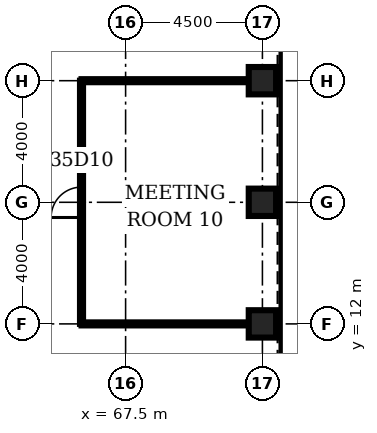
"""IFC4 building model, lengths in metres.
Left out: names, types, materials, properties, quantities, classifications, styles, units other than length and angle.
Written with IfcOpenShell. Run it as: python <this file> out.ifc"""

import sys

from ifc_helpers import new_model, si_unit, direction, frame, frame_2d, origin, origin_2d, place, context, subcontext, project, spatial, rectangle, hollow_rectangle, extrude, element, fill, save


model = new_model("IFC4")
c1 = context("Model", 3, precision=1e-05, world=origin(), true_north=direction((0.0, 1.0)))
c2 = subcontext(c1, "Body", "Model", "MODEL_VIEW")
j1 = project(units=[si_unit("LENGTHUNIT", "METRE"), si_unit("PLANEANGLEUNIT", "RADIAN")], contexts=[c1])
p1 = place(None, origin())
s1 = spatial("IfcSite", under=j1, at=p1, CompositionType="ELEMENT")
p2 = place(p1, origin())
s2 = spatial("IfcBuilding", under=s1, at=p2, CompositionType="ELEMENT")
p3 = place(p2, frame((0.0, 0.0, 159.3)))
s3 = spatial("IfcBuildingStorey", under=s2, at=p3, CompositionType="ELEMENT", Elevation=159.3)
for number, where, z_axis, x_axis in (
    (1, (72.0, 12.0, 0.0), (0.0, 0.0, 1.0), (1.0, 0.0, 0.0)),
    (2, (72.0, 16.0, 0.0), (0.0, 0.0, 1.0), (1.0, 0.0, 0.0)),
    (3, (72.0, 20.0, 0.0), (0.0, 0.0, 1.0), (1.0, 0.0, 0.0)),
):
    element("IfcColumn", number, at=place(p3, frame(where, z_axis=z_axis, x_axis=x_axis)), inside=s3, PredefinedType="COLUMN", context=c2, shape_type="SweptSolid", body=[
        extrude(hollow_rectangle(XDim=0.9, YDim=0.9, WallThickness=0.1, at=origin_2d()), origin(), (0.0, 0.0, 1.0), 4.2),
    ])
for number, where, z_axis, x_axis in (
    (4, (66.05, 12.0, 0.0), (0.0, 0.0, 1.0), (1.0, 0.0, 0.0)),
    (5, (66.05, 20.0, 0.0), (0.0, 0.0, 1.0), (1.0, 0.0, 0.0)),
):
    element("IfcWall", number, at=place(p3, frame(where, z_axis=z_axis, x_axis=x_axis)), inside=s3, PredefinedType="PARTITIONING", context=c2, shape_type="SweptSolid", body=[
        extrude(rectangle(XDim=5.5, YDim=0.1, at=frame_2d((2.75, 0.0))), origin(), (0.0, 0.0, 1.0), 3.0),
    ])
p4 = place(p3, frame((66.05, 12.0, 0.0), z_axis=(0.0, 0.0, 1.0), x_axis=(0.0, 1.0, 0.0)))
e6 = element("IfcWall", 6, at=p4, inside=s3, PredefinedType="PARTITIONING", context=c2, shape_type="SweptSolid", body=[
    extrude(rectangle(XDim=8.0, YDim=0.1, at=frame_2d((4.0, 0.0))), origin(), (0.0, 0.0, 1.0), 3.0),
])
p5 = place(p4, frame((3.5, 0.0, 0.0)))
e7 = element("IfcOpeningElement", 7, at=p5, cuts=e6, PredefinedType="OPENING", context=c2, shape_type="SweptSolid", body=[
    extrude(rectangle(XDim=1.0, YDim=2.1, at=frame_2d((0.5, 1.05))), frame((0.0, 0.06, 0.0), z_axis=(0.0, -1.0, 0.0), x_axis=(1.0, 0.0, 0.0)), (0.0, 0.0, 1.0), 0.12),
])
p6 = place(p5, origin())
e8 = element("IfcDoor", 8, at=p6, inside=s3, OperationType="SINGLE_SWING_LEFT", PredefinedType="DOOR", context=c2, shape_type="SweptSolid", body=[
    extrude(rectangle(XDim=1.0, YDim=2.1, at=frame_2d((0.5, 1.05))), frame((0.0, 0.025, 0.0), z_axis=(0.0, -1.0, 0.0), x_axis=(1.0, 0.0, 0.0)), (0.0, 0.0, 1.0), 0.05),
])
fill(e7, e8)
save(model, sys.argv[1])
